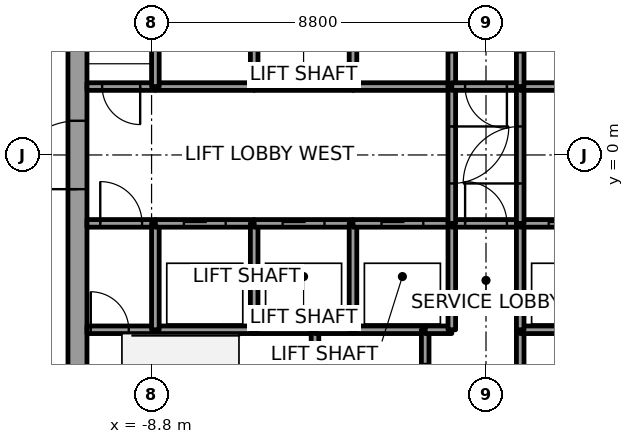
"""IFC4 building model, lengths in metres.
Left out: names, types, materials, properties, quantities, classifications, styles, units other than length and angle.
Written with IfcOpenShell. Run it as: python <this file> out.ifc"""

import sys

from ifc_helpers import new_model, si_unit, direction, frame, frame_2d, origin, place, context, subcontext, project, spatial, rectangle, extrude, element, fill, save


model = new_model("IFC4")
c1 = context("Model", 3, precision=1e-05, world=origin(), true_north=direction((0.0, 1.0)))
c2 = subcontext(c1, "Body", "Model", "MODEL_VIEW")
j1 = project(units=[si_unit("LENGTHUNIT", "METRE"), si_unit("PLANEANGLEUNIT", "RADIAN")], contexts=[c1])
p1 = place(None, origin())
s1 = spatial("IfcSite", under=j1, at=p1, CompositionType="ELEMENT")
p2 = place(p1, origin())
s2 = spatial("IfcBuilding", under=s1, at=p2, CompositionType="ELEMENT")
p3 = place(p2, frame((0.0, 0.0, 62.8)))
s3 = spatial("IfcBuildingStorey", under=s2, at=p3, CompositionType="ELEMENT", Elevation=62.8)
p4 = place(p3, frame((-10.75, -7.5, 0.0), z_axis=(0.0, 0.0, 1.0), x_axis=(0.0, 1.0, 0.0)))
e1 = element("IfcWall", 1, at=p4, inside=s3, PredefinedType="SHEAR", context=c2, shape_type="SweptSolid", body=[
    extrude(rectangle(XDim=15.0, YDim=0.5, at=frame_2d((7.5, 0.0))), origin(), (0.0, 0.0, 1.0), 3.7),
])
p5 = place(p4, frame((6.6, 0.0, 0.0)))
e2 = element("IfcOpeningElement", 2, at=p5, cuts=e1, PredefinedType="OPENING", context=c2, shape_type="SweptSolid", body=[
    extrude(rectangle(XDim=1.8, YDim=2.1, at=frame_2d((0.9, 1.05))), frame((0.0, 0.25, 0.0), z_axis=(0.0, -1.0, 0.0), x_axis=(1.0, 0.0, 0.0)), (0.0, 0.0, 1.0), 0.5),
])
p6 = place(p3, frame((-10.5, -4.6, 0.0), z_axis=(0.0, 0.0, 1.0), x_axis=(1.0, 0.0, 0.0)))
e3 = element("IfcWall", 3, at=p6, inside=s3, PredefinedType="SOLIDWALL", context=c2, shape_type="SweptSolid", body=[
    extrude(rectangle(XDim=1.8, YDim=0.2, at=frame_2d((0.9, 0.0))), origin(), (0.0, 0.0, 1.0), 3.55),
])
p7 = place(p6, frame((0.1, 0.0, 0.0)))
e4 = element("IfcOpeningElement", 4, at=p7, cuts=e3, PredefinedType="OPENING", context=c2, shape_type="SweptSolid", body=[
    extrude(rectangle(XDim=1.0, YDim=2.1, at=frame_2d((0.5, 1.05))), frame((0.0, 0.1, 0.0), z_axis=(0.0, -1.0, 0.0), x_axis=(1.0, 0.0, 0.0)), (0.0, 0.0, 1.0), 0.2),
])
p8 = place(p3, frame((-10.5, -1.8, 0.0), z_axis=(0.0, 0.0, 1.0), x_axis=(1.0, 0.0, 0.0)))
e5 = element("IfcWall", 5, at=p8, inside=s3, PredefinedType="SOLIDWALL", context=c2, shape_type="SweptSolid", body=[
    extrude(rectangle(XDim=1.8, YDim=0.2, at=frame_2d((0.9, 0.0))), origin(), (0.0, 0.0, 1.0), 3.55),
])
p9 = place(p8, frame((0.35, 0.0, 0.0)))
e6 = element("IfcOpeningElement", 6, at=p9, cuts=e5, PredefinedType="OPENING", context=c2, shape_type="SweptSolid", body=[
    extrude(rectangle(XDim=1.1, YDim=2.1, at=frame_2d((0.55, 1.05))), frame((0.0, 0.1, 0.0), z_axis=(0.0, -1.0, 0.0), x_axis=(1.0, 0.0, 0.0)), (0.0, 0.0, 1.0), 0.2),
])
p10 = place(p3, frame((-8.7, 1.8, 0.0), z_axis=(0.0, 0.0, 1.0), x_axis=(-1.0, 0.0, 0.0)))
e7 = element("IfcWall", 7, at=p10, inside=s3, PredefinedType="SOLIDWALL", context=c2, shape_type="SweptSolid", body=[
    extrude(rectangle(XDim=1.8, YDim=0.2, at=frame_2d((0.9, 0.0))), origin(), (0.0, 0.0, 1.0), 3.55),
])
p11 = place(p10, frame((0.4, 0.0, 0.0)))
e8 = element("IfcOpeningElement", 8, at=p11, cuts=e7, PredefinedType="OPENING", context=c2, shape_type="SweptSolid", body=[
    extrude(rectangle(XDim=1.0, YDim=2.1, at=frame_2d((0.5, 1.05))), frame((0.0, 0.1, 0.0), z_axis=(0.0, -1.0, 0.0), x_axis=(1.0, 0.0, 0.0)), (0.0, 0.0, 1.0), 0.2),
])
p12 = place(p3, frame((-8.7, -4.6, 0.0), z_axis=(0.0, 0.0, 1.0), x_axis=(1.0, 0.0, 0.0)))
e9 = element("IfcWall", 9, at=p12, inside=s3, PredefinedType="SOLIDWALL", context=c2, shape_type="SweptSolid", body=[
    extrude(rectangle(XDim=2.6, YDim=0.2, at=frame_2d((1.3, 0.0))), origin(), (0.0, 0.0, 1.0), 3.55),
])
p13 = place(p3, frame((-8.7, -4.6, 0.0), z_axis=(0.0, 0.0, 1.0), x_axis=(0.0, 1.0, 0.0)))
e10 = element("IfcWall", 10, at=p13, inside=s3, PredefinedType="SOLIDWALL", context=c2, shape_type="SweptSolid", body=[
    extrude(rectangle(XDim=2.8, YDim=0.2, at=frame_2d((1.4, 0.0))), origin(), (0.0, 0.0, 1.0), 3.55),
])
p14 = place(p3, frame((-8.7, -1.8, 0.0), z_axis=(0.0, 0.0, 1.0), x_axis=(1.0, 0.0, 0.0)))
e11 = element("IfcWall", 11, at=p14, inside=s3, PredefinedType="SOLIDWALL", context=c2, shape_type="SweptSolid", body=[
    extrude(rectangle(XDim=2.6, YDim=0.2, at=frame_2d((1.3, 0.0))), origin(), (0.0, 0.0, 1.0), 3.55),
])
p15 = place(p14, frame((0.75, 0.0, 0.0)))
e12 = element("IfcOpeningElement", 12, at=p15, cuts=e11, PredefinedType="OPENING", context=c2, shape_type="SweptSolid", body=[
    extrude(rectangle(XDim=1.1, YDim=2.1, at=frame_2d((0.55, 1.05))), frame((0.0, 0.1, 0.0), z_axis=(0.0, -1.0, 0.0), x_axis=(1.0, 0.0, 0.0)), (0.0, 0.0, 1.0), 0.2),
])
p16 = place(p3, frame((-6.1, 1.8, 0.0), z_axis=(0.0, 0.0, 1.0), x_axis=(-1.0, 0.0, 0.0)))
e13 = element("IfcWall", 13, at=p16, inside=s3, PredefinedType="SOLIDWALL", context=c2, shape_type="SweptSolid", body=[
    extrude(rectangle(XDim=2.6, YDim=0.2, at=frame_2d((1.3, 0.0))), origin(), (0.0, 0.0, 1.0), 3.55),
])
p17 = place(p3, frame((-8.7, 1.8, 0.0), z_axis=(0.0, 0.0, 1.0), x_axis=(0.0, 1.0, 0.0)))
e14 = element("IfcWall", 14, at=p17, inside=s3, PredefinedType="SOLIDWALL", context=c2, shape_type="SweptSolid", body=[
    extrude(rectangle(XDim=2.8, YDim=0.2, at=frame_2d((1.4, 0.0))), origin(), (0.0, 0.0, 1.0), 3.55),
])
p18 = place(p3, frame((-6.1, -4.6, 0.0), z_axis=(0.0, 0.0, 1.0), x_axis=(1.0, 0.0, 0.0)))
e15 = element("IfcWall", 15, at=p18, inside=s3, PredefinedType="SOLIDWALL", context=c2, shape_type="SweptSolid", body=[
    extrude(rectangle(XDim=1.6, YDim=0.2, at=frame_2d((0.8, 0.0))), origin(), (0.0, 0.0, 1.0), 3.55),
])
p19 = place(p3, frame((-6.1, -4.6, 0.0), z_axis=(0.0, 0.0, 1.0), x_axis=(0.0, 1.0, 0.0)))
e16 = element("IfcWall", 16, at=p19, inside=s3, PredefinedType="SOLIDWALL", context=c2, shape_type="SweptSolid", body=[
    extrude(rectangle(XDim=2.8, YDim=0.2, at=frame_2d((1.4, 0.0))), origin(), (0.0, 0.0, 1.0), 3.55),
])
p20 = place(p3, frame((-6.1, -1.8, 0.0), z_axis=(0.0, 0.0, 1.0), x_axis=(1.0, 0.0, 0.0)))
e17 = element("IfcWall", 17, at=p20, inside=s3, PredefinedType="SOLIDWALL", context=c2, shape_type="SweptSolid", body=[
    extrude(rectangle(XDim=2.6, YDim=0.2, at=frame_2d((1.3, 0.0))), origin(), (0.0, 0.0, 1.0), 3.55),
])
p21 = place(p20, frame((0.75, 0.0, 0.0)))
e18 = element("IfcOpeningElement", 18, at=p21, cuts=e17, PredefinedType="OPENING", context=c2, shape_type="SweptSolid", body=[
    extrude(rectangle(XDim=1.1, YDim=2.1, at=frame_2d((0.55, 1.05))), frame((0.0, 0.1, 0.0), z_axis=(0.0, -1.0, 0.0), x_axis=(1.0, 0.0, 0.0)), (0.0, 0.0, 1.0), 0.2),
])
p22 = place(p3, frame((-3.5, 1.8, 0.0), z_axis=(0.0, 0.0, 1.0), x_axis=(-1.0, 0.0, 0.0)))
e19 = element("IfcWall", 19, at=p22, inside=s3, PredefinedType="SOLIDWALL", context=c2, shape_type="SweptSolid", body=[
    extrude(rectangle(XDim=2.6, YDim=0.2, at=frame_2d((1.3, 0.0))), origin(), (0.0, 0.0, 1.0), 3.55),
])
p23 = place(p3, frame((-6.1, 1.8, 0.0), z_axis=(0.0, 0.0, 1.0), x_axis=(0.0, 1.0, 0.0)))
e20 = element("IfcWall", 20, at=p23, inside=s3, PredefinedType="SOLIDWALL", context=c2, shape_type="SweptSolid", body=[
    extrude(rectangle(XDim=2.8, YDim=0.2, at=frame_2d((1.4, 0.0))), origin(), (0.0, 0.0, 1.0), 3.55),
])
p24 = place(p3, frame((-4.5, -4.6, 0.0), z_axis=(0.0, 0.0, 1.0), x_axis=(0.0, -1.0, 0.0)))
e21 = element("IfcWall", 21, at=p24, inside=s3, PredefinedType="SOLIDWALL", context=c2, shape_type="SweptSolid", body=[
    extrude(rectangle(XDim=2.9, YDim=0.2, at=frame_2d((1.45, 0.0))), origin(), (0.0, 0.0, 1.0), 3.55),
])
p25 = place(p3, frame((-4.5, -4.6, 0.0), z_axis=(0.0, 0.0, 1.0), x_axis=(1.0, 0.0, 0.0)))
e22 = element("IfcWall", 22, at=p25, inside=s3, PredefinedType="SOLIDWALL", context=c2, shape_type="SweptSolid", body=[
    extrude(rectangle(XDim=1.0, YDim=0.2, at=frame_2d((0.5, 0.0))), origin(), (0.0, 0.0, 1.0), 3.55),
])
p26 = place(p3, frame((-3.5, -4.6, 0.0), z_axis=(0.0, 0.0, 1.0), x_axis=(1.0, 0.0, 0.0)))
e23 = element("IfcWall", 23, at=p26, inside=s3, PredefinedType="SOLIDWALL", context=c2, shape_type="SweptSolid", body=[
    extrude(rectangle(XDim=1.9, YDim=0.2, at=frame_2d((0.95, 0.0))), origin(), (0.0, 0.0, 1.0), 3.55),
])
p27 = place(p3, frame((-3.5, -4.6, 0.0), z_axis=(0.0, 0.0, 1.0), x_axis=(0.0, 1.0, 0.0)))
e24 = element("IfcWall", 24, at=p27, inside=s3, PredefinedType="SOLIDWALL", context=c2, shape_type="SweptSolid", body=[
    extrude(rectangle(XDim=2.8, YDim=0.2, at=frame_2d((1.4, 0.0))), origin(), (0.0, 0.0, 1.0), 3.55),
])
p28 = place(p3, frame((-3.5, -1.8, 0.0), z_axis=(0.0, 0.0, 1.0), x_axis=(1.0, 0.0, 0.0)))
e25 = element("IfcWall", 25, at=p28, inside=s3, PredefinedType="SOLIDWALL", context=c2, shape_type="SweptSolid", body=[
    extrude(rectangle(XDim=2.6, YDim=0.2, at=frame_2d((1.3, 0.0))), origin(), (0.0, 0.0, 1.0), 3.55),
])
p29 = place(p28, frame((0.75, 0.0, 0.0)))
e26 = element("IfcOpeningElement", 26, at=p29, cuts=e25, PredefinedType="OPENING", context=c2, shape_type="SweptSolid", body=[
    extrude(rectangle(XDim=1.1, YDim=2.1, at=frame_2d((0.55, 1.05))), frame((0.0, 0.1, 0.0), z_axis=(0.0, -1.0, 0.0), x_axis=(1.0, 0.0, 0.0)), (0.0, 0.0, 1.0), 0.2),
])
p30 = place(p3, frame((-0.9, 1.8, 0.0), z_axis=(0.0, 0.0, 1.0), x_axis=(-1.0, 0.0, 0.0)))
e27 = element("IfcWall", 27, at=p30, inside=s3, PredefinedType="SOLIDWALL", context=c2, shape_type="SweptSolid", body=[
    extrude(rectangle(XDim=2.6, YDim=0.2, at=frame_2d((1.3, 0.0))), origin(), (0.0, 0.0, 1.0), 3.55),
])
p31 = place(p3, frame((-3.5, 4.6, 0.0), z_axis=(0.0, 0.0, 1.0), x_axis=(0.0, -1.0, 0.0)))
e28 = element("IfcWall", 28, at=p31, inside=s3, PredefinedType="SOLIDWALL", context=c2, shape_type="SweptSolid", body=[
    extrude(rectangle(XDim=2.8, YDim=0.2, at=frame_2d((1.4, 0.0))), origin(), (0.0, 0.0, 1.0), 3.55),
])
p32 = place(p3, frame((-0.9, 1.8, 0.0), z_axis=(0.0, 0.0, 1.0), x_axis=(0.0, 1.0, 0.0)))
e29 = element("IfcWall", 29, at=p32, inside=s3, PredefinedType="SOLIDWALL", context=c2, shape_type="SweptSolid", body=[
    extrude(rectangle(XDim=3.0, YDim=0.2, at=frame_2d((1.5, 0.0))), origin(), (0.0, 0.0, 1.0), 3.55),
])
p33 = place(p32, frame((0.9, 0.0, 0.0)))
e30 = element("IfcOpeningElement", 30, at=p33, cuts=e29, PredefinedType="OPENING", context=c2, shape_type="SweptSolid", body=[
    extrude(rectangle(XDim=1.2, YDim=2.1, at=frame_2d((0.6, 1.05))), frame((0.0, 0.1, 0.0), z_axis=(0.0, -1.0, 0.0), x_axis=(1.0, 0.0, 0.0)), (0.0, 0.0, 1.0), 0.2),
])
p34 = place(p3, frame((-1.6, -7.5, 0.0), z_axis=(0.0, 0.0, 1.0), x_axis=(0.0, 1.0, 0.0)))
e31 = element("IfcWall", 31, at=p34, inside=s3, PredefinedType="SOLIDWALL", context=c2, shape_type="SweptSolid", body=[
    extrude(rectangle(XDim=2.9, YDim=0.2, at=frame_2d((1.45, 0.0))), origin(), (0.0, 0.0, 1.0), 3.55),
])
p35 = place(p34, frame((0.9, 0.0, 0.0)))
e32 = element("IfcOpeningElement", 32, at=p35, cuts=e31, PredefinedType="OPENING", context=c2, shape_type="SweptSolid", body=[
    extrude(rectangle(XDim=1.1, YDim=2.1, at=frame_2d((0.55, 1.05))), frame((0.0, 0.1, 0.0), z_axis=(0.0, -1.0, 0.0), x_axis=(1.0, 0.0, 0.0)), (0.0, 0.0, 1.0), 0.2),
])
p36 = place(p3, frame((-1.6, -4.6, 0.0), z_axis=(0.0, 0.0, 1.0), x_axis=(1.0, 0.0, 0.0)))
e33 = element("IfcWall", 33, at=p36, inside=s3, PredefinedType="SOLIDWALL", context=c2, shape_type="SweptSolid", body=[
    extrude(rectangle(XDim=0.7, YDim=0.2, at=frame_2d((0.35, 0.0))), origin(), (0.0, 0.0, 1.0), 3.55),
])
p37 = place(p3, frame((-0.9, -4.6, 0.0), z_axis=(0.0, 0.0, 1.0), x_axis=(0.0, 1.0, 0.0)))
e34 = element("IfcWall", 34, at=p37, inside=s3, PredefinedType="SOLIDWALL", context=c2, shape_type="SweptSolid", body=[
    extrude(rectangle(XDim=2.8, YDim=0.2, at=frame_2d((1.4, 0.0))), origin(), (0.0, 0.0, 1.0), 3.55),
])
p38 = place(p3, frame((-0.9, -1.8, 0.0), z_axis=(0.0, 0.0, 1.0), x_axis=(1.0, 0.0, 0.0)))
e35 = element("IfcWall", 35, at=p38, inside=s3, PredefinedType="SOLIDWALL", context=c2, shape_type="SweptSolid", body=[
    extrude(rectangle(XDim=1.8, YDim=0.2, at=frame_2d((0.9, 0.0))), origin(), (0.0, 0.0, 1.0), 3.55),
])
p39 = place(p38, frame((0.35, 0.0, 0.0)))
e36 = element("IfcOpeningElement", 36, at=p39, cuts=e35, PredefinedType="OPENING", context=c2, shape_type="SweptSolid", body=[
    extrude(rectangle(XDim=1.1, YDim=2.1, at=frame_2d((0.55, 1.05))), frame((0.0, 0.1, 0.0), z_axis=(0.0, -1.0, 0.0), x_axis=(1.0, 0.0, 0.0)), (0.0, 0.0, 1.0), 0.2),
])
p40 = place(p3, frame((-0.9, 1.8, 0.0), z_axis=(0.0, 0.0, 1.0), x_axis=(0.0, -1.0, 0.0)))
e37 = element("IfcWall", 37, at=p40, inside=s3, PredefinedType="SOLIDWALL", context=c2, shape_type="SweptSolid", body=[
    extrude(rectangle(XDim=3.6, YDim=0.2, at=frame_2d((1.8, 0.0))), origin(), (0.0, 0.0, 1.0), 3.55),
])
p41 = place(p40, frame((1.05, 0.0, 0.0)))
e38 = element("IfcOpeningElement", 38, at=p41, cuts=e37, PredefinedType="OPENING", context=c2, shape_type="SweptSolid", body=[
    extrude(rectangle(XDim=1.5, YDim=2.1, at=frame_2d((0.75, 1.05))), frame((0.0, 0.1, 0.0), z_axis=(0.0, -1.0, 0.0), x_axis=(1.0, 0.0, 0.0)), (0.0, 0.0, 1.0), 0.2),
])
p42 = place(p3, frame((0.9, 1.8, 0.0), z_axis=(0.0, 0.0, 1.0), x_axis=(-1.0, 0.0, 0.0)))
e39 = element("IfcWall", 39, at=p42, inside=s3, PredefinedType="SOLIDWALL", context=c2, shape_type="SweptSolid", body=[
    extrude(rectangle(XDim=1.8, YDim=0.2, at=frame_2d((0.9, 0.0))), origin(), (0.0, 0.0, 1.0), 3.55),
])
p43 = place(p42, frame((0.35, 0.0, 0.0)))
e40 = element("IfcOpeningElement", 40, at=p43, cuts=e39, PredefinedType="OPENING", context=c2, shape_type="SweptSolid", body=[
    extrude(rectangle(XDim=1.1, YDim=2.1, at=frame_2d((0.55, 1.05))), frame((0.0, 0.1, 0.0), z_axis=(0.0, -1.0, 0.0), x_axis=(1.0, 0.0, 0.0)), (0.0, 0.0, 1.0), 0.2),
])
p44 = place(p3, frame((0.9, -4.6, 0.0), z_axis=(0.0, 0.0, 1.0), x_axis=(0.0, -1.0, 0.0)))
e41 = element("IfcWall", 41, at=p44, inside=s3, PredefinedType="SOLIDWALL", context=c2, shape_type="SweptSolid", body=[
    extrude(rectangle(XDim=2.9, YDim=0.2, at=frame_2d((1.45, 0.0))), origin(), (0.0, 0.0, 1.0), 3.55),
])
p45 = place(p44, frame((1.0, 0.0, 0.0)))
e42 = element("IfcOpeningElement", 42, at=p45, cuts=e41, PredefinedType="OPENING", context=c2, shape_type="SweptSolid", body=[
    extrude(rectangle(XDim=0.9, YDim=2.1, at=frame_2d((0.45, 1.05))), frame((0.0, 0.1, 0.0), z_axis=(0.0, -1.0, 0.0), x_axis=(1.0, 0.0, 0.0)), (0.0, 0.0, 1.0), 0.2),
])
p46 = place(p3, frame((3.5, -4.6, 0.0), z_axis=(0.0, 0.0, 1.0), x_axis=(-1.0, 0.0, 0.0)))
e43 = element("IfcWall", 43, at=p46, inside=s3, PredefinedType="SOLIDWALL", context=c2, shape_type="SweptSolid", body=[
    extrude(rectangle(XDim=2.6, YDim=0.2, at=frame_2d((1.3, 0.0))), origin(), (0.0, 0.0, 1.0), 3.55),
])
p47 = place(p3, frame((0.9, -1.8, 0.0), z_axis=(0.0, 0.0, 1.0), x_axis=(0.0, -1.0, 0.0)))
e44 = element("IfcWall", 44, at=p47, inside=s3, PredefinedType="SOLIDWALL", context=c2, shape_type="SweptSolid", body=[
    extrude(rectangle(XDim=2.8, YDim=0.2, at=frame_2d((1.4, 0.0))), origin(), (0.0, 0.0, 1.0), 3.55),
])
p48 = place(p3, frame((0.9, -1.8, 0.0), z_axis=(0.0, 0.0, 1.0), x_axis=(1.0, 0.0, 0.0)))
e45 = element("IfcWall", 45, at=p48, inside=s3, PredefinedType="SOLIDWALL", context=c2, shape_type="SweptSolid", body=[
    extrude(rectangle(XDim=2.6, YDim=0.2, at=frame_2d((1.3, 0.0))), origin(), (0.0, 0.0, 1.0), 3.55),
])
p49 = place(p48, frame((0.75, 0.0, 0.0)))
e46 = element("IfcOpeningElement", 46, at=p49, cuts=e45, PredefinedType="OPENING", context=c2, shape_type="SweptSolid", body=[
    extrude(rectangle(XDim=1.1, YDim=2.1, at=frame_2d((0.55, 1.05))), frame((0.0, 0.1, 0.0), z_axis=(0.0, -1.0, 0.0), x_axis=(1.0, 0.0, 0.0)), (0.0, 0.0, 1.0), 0.2),
])
p50 = place(p3, frame((0.9, -1.8, 0.0), z_axis=(0.0, 0.0, 1.0), x_axis=(0.0, 1.0, 0.0)))
e47 = element("IfcWall", 47, at=p50, inside=s3, PredefinedType="SOLIDWALL", context=c2, shape_type="SweptSolid", body=[
    extrude(rectangle(XDim=3.6, YDim=0.2, at=frame_2d((1.8, 0.0))), origin(), (0.0, 0.0, 1.0), 3.55),
])
p51 = place(p50, frame((1.05, 0.0, 0.0)))
e48 = element("IfcOpeningElement", 48, at=p51, cuts=e47, PredefinedType="OPENING", context=c2, shape_type="SweptSolid", body=[
    extrude(rectangle(XDim=1.5, YDim=2.1, at=frame_2d((0.75, 1.05))), frame((0.0, 0.1, 0.0), z_axis=(0.0, -1.0, 0.0), x_axis=(1.0, 0.0, 0.0)), (0.0, 0.0, 1.0), 0.2),
])
p52 = place(p3, frame((3.5, 1.8, 0.0), z_axis=(0.0, 0.0, 1.0), x_axis=(-1.0, 0.0, 0.0)))
e49 = element("IfcWall", 49, at=p52, inside=s3, PredefinedType="SOLIDWALL", context=c2, shape_type="SweptSolid", body=[
    extrude(rectangle(XDim=2.6, YDim=0.2, at=frame_2d((1.3, 0.0))), origin(), (0.0, 0.0, 1.0), 3.55),
])
p53 = place(p3, frame((0.9, 4.8, 0.0), z_axis=(0.0, 0.0, 1.0), x_axis=(0.0, -1.0, 0.0)))
e50 = element("IfcWall", 50, at=p53, inside=s3, PredefinedType="SOLIDWALL", context=c2, shape_type="SweptSolid", body=[
    extrude(rectangle(XDim=3.0, YDim=0.2, at=frame_2d((1.5, 0.0))), origin(), (0.0, 0.0, 1.0), 3.55),
])
p54 = place(p53, frame((0.9, 0.0, 0.0)))
e51 = element("IfcOpeningElement", 51, at=p54, cuts=e50, PredefinedType="OPENING", context=c2, shape_type="SweptSolid", body=[
    extrude(rectangle(XDim=1.2, YDim=2.1, at=frame_2d((0.6, 1.05))), frame((0.0, 0.1, 0.0), z_axis=(0.0, -1.0, 0.0), x_axis=(1.0, 0.0, 0.0)), (0.0, 0.0, 1.0), 0.2),
])
p55 = place(p15, origin())
e52 = element("IfcDoor", 52, at=p55, inside=s3, OperationType="SLIDING_TO_RIGHT", PredefinedType="DOOR", context=c2, shape_type="SweptSolid", body=[
    extrude(rectangle(XDim=1.1, YDim=2.1, at=frame_2d((0.55, 1.05))), frame((0.0, 0.025, 0.0), z_axis=(0.0, -1.0, 0.0), x_axis=(1.0, 0.0, 0.0)), (0.0, 0.0, 1.0), 0.05),
])
fill(e12, e52)
p56 = place(p21, origin())
e53 = element("IfcDoor", 53, at=p56, inside=s3, OperationType="SLIDING_TO_RIGHT", PredefinedType="DOOR", context=c2, shape_type="SweptSolid", body=[
    extrude(rectangle(XDim=1.1, YDim=2.1, at=frame_2d((0.55, 1.05))), frame((0.0, 0.025, 0.0), z_axis=(0.0, -1.0, 0.0), x_axis=(1.0, 0.0, 0.0)), (0.0, 0.0, 1.0), 0.05),
])
fill(e18, e53)
p57 = place(p29, origin())
e54 = element("IfcDoor", 54, at=p57, inside=s3, OperationType="SLIDING_TO_RIGHT", PredefinedType="DOOR", context=c2, shape_type="SweptSolid", body=[
    extrude(rectangle(XDim=1.1, YDim=2.1, at=frame_2d((0.55, 1.05))), frame((0.0, 0.025, 0.0), z_axis=(0.0, -1.0, 0.0), x_axis=(1.0, 0.0, 0.0)), (0.0, 0.0, 1.0), 0.05),
])
fill(e26, e54)
p58 = place(p49, origin())
e55 = element("IfcDoor", 55, at=p58, inside=s3, OperationType="SLIDING_TO_LEFT", PredefinedType="DOOR", context=c2, shape_type="SweptSolid", body=[
    extrude(rectangle(XDim=1.1, YDim=2.1, at=frame_2d((0.55, 1.05))), frame((0.0, 0.025, 0.0), z_axis=(0.0, -1.0, 0.0), x_axis=(1.0, 0.0, 0.0)), (0.0, 0.0, 1.0), 0.05),
])
fill(e46, e55)
p59 = place(p41, origin())
e56 = element("IfcDoor", 56, at=p59, inside=s3, OperationType="DOUBLE_DOOR_SINGLE_SWING", PredefinedType="DOOR", context=c2, shape_type="SweptSolid", body=[
    extrude(rectangle(XDim=1.5, YDim=2.1, at=frame_2d((0.75, 1.05))), frame((0.0, 0.025, 0.0), z_axis=(0.0, -1.0, 0.0), x_axis=(1.0, 0.0, 0.0)), (0.0, 0.0, 1.0), 0.05),
])
fill(e38, e56)
p60 = place(p51, origin())
e57 = element("IfcDoor", 57, at=p60, inside=s3, OperationType="DOUBLE_DOOR_SINGLE_SWING", PredefinedType="DOOR", context=c2, shape_type="SweptSolid", body=[
    extrude(rectangle(XDim=1.5, YDim=2.1, at=frame_2d((0.75, 1.05))), frame((0.0, 0.025, 0.0), z_axis=(0.0, -1.0, 0.0), x_axis=(1.0, 0.0, 0.0)), (0.0, 0.0, 1.0), 0.05),
])
fill(e48, e57)
p61 = place(p9, origin())
e58 = element("IfcDoor", 58, at=p61, inside=s3, OperationType="SINGLE_SWING_LEFT", PredefinedType="DOOR", context=c2, shape_type="SweptSolid", body=[
    extrude(rectangle(XDim=1.1, YDim=2.1, at=frame_2d((0.55, 1.05))), frame((0.0, 0.025, 0.0), z_axis=(0.0, -1.0, 0.0), x_axis=(1.0, 0.0, 0.0)), (0.0, 0.0, 1.0), 0.05),
])
fill(e6, e58)
p62 = place(p43, origin())
e59 = element("IfcDoor", 59, at=p62, inside=s3, OperationType="SINGLE_SWING_RIGHT", PredefinedType="DOOR", context=c2, shape_type="SweptSolid", body=[
    extrude(rectangle(XDim=1.1, YDim=2.1, at=frame_2d((0.55, 1.05))), frame((0.0, 0.025, 0.0), z_axis=(0.0, -1.0, 0.0), x_axis=(1.0, 0.0, 0.0)), (0.0, 0.0, 1.0), 0.05),
])
fill(e40, e59)
p63 = place(p39, origin())
e60 = element("IfcDoor", 60, at=p63, inside=s3, OperationType="SINGLE_SWING_LEFT", PredefinedType="DOOR", context=c2, shape_type="SweptSolid", body=[
    extrude(rectangle(XDim=1.1, YDim=2.1, at=frame_2d((0.55, 1.05))), frame((0.0, 0.025, 0.0), z_axis=(0.0, -1.0, 0.0), x_axis=(1.0, 0.0, 0.0)), (0.0, 0.0, 1.0), 0.05),
])
fill(e36, e60)
p64 = place(p11, origin())
e61 = element("IfcDoor", 61, at=p64, inside=s3, OperationType="SINGLE_SWING_LEFT", PredefinedType="DOOR", context=c2, shape_type="SweptSolid", body=[
    extrude(rectangle(XDim=1.0, YDim=2.1, at=frame_2d((0.5, 1.05))), frame((0.0, 0.025, 0.0), z_axis=(0.0, -1.0, 0.0), x_axis=(1.0, 0.0, 0.0)), (0.0, 0.0, 1.0), 0.05),
])
fill(e8, e61)
p65 = place(p7, origin())
e62 = element("IfcDoor", 62, at=p65, inside=s3, OperationType="SINGLE_SWING_LEFT", PredefinedType="DOOR", context=c2, shape_type="SweptSolid", body=[
    extrude(rectangle(XDim=1.0, YDim=2.1, at=frame_2d((0.5, 1.05))), frame((0.0, 0.025, 0.0), z_axis=(0.0, -1.0, 0.0), x_axis=(1.0, 0.0, 0.0)), (0.0, 0.0, 1.0), 0.05),
])
fill(e4, e62)
p66 = place(p5, origin())
e63 = element("IfcDoor", 63, at=p66, inside=s3, OperationType="DOUBLE_DOOR_SINGLE_SWING", PredefinedType="DOOR", context=c2, shape_type="SweptSolid", body=[
    extrude(rectangle(XDim=1.8, YDim=2.1, at=frame_2d((0.9, 1.05))), frame((0.0, 0.025, 0.0), z_axis=(0.0, -1.0, 0.0), x_axis=(1.0, 0.0, 0.0)), (0.0, 0.0, 1.0), 0.05),
])
fill(e2, e63)
save(model, sys.argv[1])
